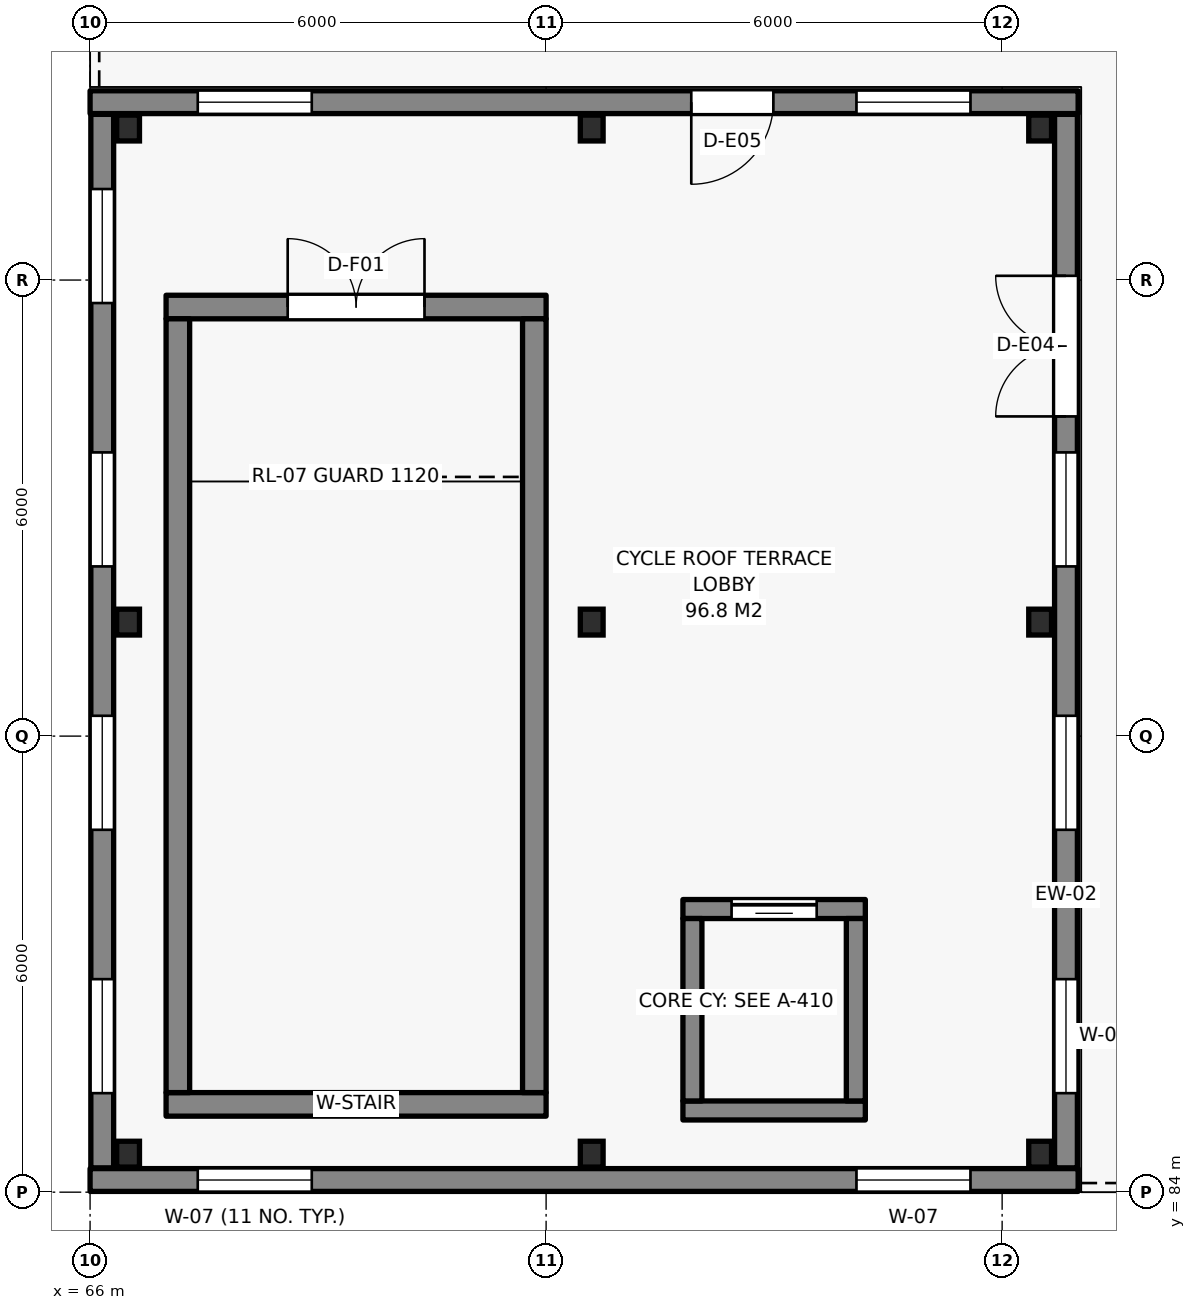
"""IFC4 building model, lengths in metres.
Left out: names, types, materials, properties, quantities, classifications, styles, units other than length and angle.
Written with IfcOpenShell. Run it as: python <this file> out.ifc"""

import sys

from ifc_helpers import new_model, si_unit, direction, frame, frame_2d, origin, origin_2d, place, context, subcontext, project, spatial, rectangle, i_section, extrude, element, fill, save


model = new_model("IFC4")
c1 = context("Model", 3, precision=1e-05, world=origin(), true_north=direction((0.0, 1.0)))
c2 = subcontext(c1, "Body", "Model", "MODEL_VIEW")
j1 = project(units=[si_unit("LENGTHUNIT", "METRE"), si_unit("PLANEANGLEUNIT", "RADIAN")], contexts=[c1])
p1 = place(None, origin())
s1 = spatial("IfcSite", under=j1, at=p1, CompositionType="ELEMENT")
p2 = place(p1, origin())
s2 = spatial("IfcBuilding", under=s1, at=p2, CompositionType="ELEMENT")
p3 = place(p2, frame((0.0, 0.0, 10.5)))
s3 = spatial("IfcBuildingStorey", under=s2, at=p3, CompositionType="ELEMENT", Elevation=10.5)
p4 = place(p3, frame((67.0, 85.155, 0.0), z_axis=(0.0, 0.0, 1.0), x_axis=(1.0, 0.0, 0.0)))
e1 = element("IfcWall", 1, at=p4, inside=s3, PredefinedType="SHEAR", context=c2, shape_type="SweptSolid", body=[
    extrude(rectangle(XDim=5.0, YDim=0.31, at=frame_2d((2.5, 0.0))), origin(), (0.0, 0.0, 1.0), 3.9),
])
p5 = place(p3, frame((67.0, 95.645, 0.0), z_axis=(0.0, 0.0, 1.0), x_axis=(1.0, 0.0, 0.0)))
e2 = element("IfcWall", 2, at=p5, inside=s3, PredefinedType="SHEAR", context=c2, shape_type="SweptSolid", body=[
    extrude(rectangle(XDim=5.0, YDim=0.31, at=frame_2d((2.5, 0.0))), origin(), (0.0, 0.0, 1.0), 3.9),
])
p6 = place(p5, frame((1.6, 0.0, 0.0)))
e3 = element("IfcOpeningElement", 3, at=p6, cuts=e2, PredefinedType="OPENING", context=c2, shape_type="SweptSolid", body=[
    extrude(rectangle(XDim=1.8, YDim=2.15, at=frame_2d((0.9, 1.075))), frame((0.0, 0.165, 0.0), z_axis=(0.0, -1.0, 0.0), x_axis=(1.0, 0.0, 0.0)), (0.0, 0.0, 1.0), 0.33),
])
for number, where, z_axis, x_axis in (
    (4, (67.155, 85.31, 0.0), (0.0, 0.0, 1.0), (0.0, 1.0, 0.0)),
    (5, (71.845, 85.31, 0.0), (0.0, 0.0, 1.0), (0.0, 1.0, 0.0)),
):
    element("IfcWall", number, at=place(p3, frame(where, z_axis=z_axis, x_axis=x_axis)), inside=s3, PredefinedType="SHEAR", context=c2, shape_type="SweptSolid", body=[
        extrude(rectangle(XDim=10.18, YDim=0.31, at=frame_2d((5.09, 0.0))), origin(), (0.0, 0.0, 1.0), 3.9),
    ])
for number, where, z_axis, x_axis in (
    (6, (66.5, 84.5, 0.0), (0.0, 0.0, 1.0), (1.0, 0.0, 0.0)),
    (7, (66.5, 91.5, 0.0), (0.0, 0.0, 1.0), (1.0, 0.0, 0.0)),
    (8, (66.5, 98.0, 0.0), (0.0, 0.0, 1.0), (1.0, 0.0, 0.0)),
    (9, (72.6, 84.5, 0.0), (0.0, 0.0, 1.0), (1.0, 0.0, 0.0)),
    (10, (72.6, 91.5, 0.0), (0.0, 0.0, 1.0), (1.0, 0.0, 0.0)),
    (11, (72.6, 98.0, 0.0), (0.0, 0.0, 1.0), (1.0, 0.0, 0.0)),
    (12, (78.5, 84.5, 0.0), (0.0, 0.0, 1.0), (1.0, 0.0, 0.0)),
    (13, (78.5, 91.5, 0.0), (0.0, 0.0, 1.0), (1.0, 0.0, 0.0)),
    (14, (78.5, 98.0, 0.0), (0.0, 0.0, 1.0), (1.0, 0.0, 0.0)),
):
    element("IfcColumn", number, at=place(p3, frame(where, z_axis=z_axis, x_axis=x_axis)), inside=s3, PredefinedType="COLUMN", context=c2, shape_type="SweptSolid", body=[
        extrude(i_section(OverallWidth=0.3, OverallDepth=0.34, WebThickness=0.012, FlangeThickness=0.021, FilletRadius=0.027, at=origin_2d()), origin(), (0.0, 0.0, 1.0), 3.9),
    ])
p7 = place(p3, frame((66.0, 84.16, 0.0), z_axis=(0.0, 0.0, 1.0), x_axis=(1.0, 0.0, 0.0)))
e15 = element("IfcWall", 15, at=p7, inside=s3, PredefinedType="SOLIDWALL", context=c2, shape_type="SweptSolid", body=[
    extrude(rectangle(XDim=13.0, YDim=0.3, at=frame_2d((6.5, 0.0))), origin(), (0.0, 0.0, 1.0), 3.88),
])
p8 = place(p7, frame((1.417, 0.0, 0.95)))
e16 = element("IfcOpeningElement", 16, at=p8, cuts=e15, PredefinedType="OPENING", context=c2, shape_type="SweptSolid", body=[
    extrude(rectangle(XDim=1.5, YDim=1.8, at=frame_2d((0.75, 0.9))), frame((0.0, 0.16, 0.0), z_axis=(0.0, -1.0, 0.0), x_axis=(1.0, 0.0, 0.0)), (0.0, 0.0, 1.0), 0.32),
])
p9 = place(p7, frame((10.083, 0.0, 0.95)))
e17 = element("IfcOpeningElement", 17, at=p9, cuts=e15, PredefinedType="OPENING", context=c2, shape_type="SweptSolid", body=[
    extrude(rectangle(XDim=1.5, YDim=1.8, at=frame_2d((0.75, 0.9))), frame((0.0, 0.16, 0.0), z_axis=(0.0, -1.0, 0.0), x_axis=(1.0, 0.0, 0.0)), (0.0, 0.0, 1.0), 0.32),
])
p10 = place(p3, frame((78.84, 84.32, 0.0), z_axis=(0.0, 0.0, 1.0), x_axis=(0.0, 1.0, 0.0)))
e18 = element("IfcWall", 18, at=p10, inside=s3, PredefinedType="SOLIDWALL", context=c2, shape_type="SweptSolid", body=[
    extrude(rectangle(XDim=13.86, YDim=0.3, at=frame_2d((6.93, 0.0))), origin(), (0.0, 0.0, 1.0), 3.88),
])
p11 = place(p10, frame((9.886, 0.0, 0.0)))
e19 = element("IfcOpeningElement", 19, at=p11, cuts=e18, PredefinedType="OPENING", context=c2, shape_type="SweptSolid", body=[
    extrude(rectangle(XDim=1.85, YDim=2.25, at=frame_2d((0.925, 1.125))), frame((0.0, 0.16, 0.0), z_axis=(0.0, -1.0, 0.0), x_axis=(1.0, 0.0, 0.0)), (0.0, 0.0, 1.0), 0.32),
])
p12 = place(p10, frame((0.982, 0.0, 0.95)))
e20 = element("IfcOpeningElement", 20, at=p12, cuts=e18, PredefinedType="OPENING", context=c2, shape_type="SweptSolid", body=[
    extrude(rectangle(XDim=1.5, YDim=1.8, at=frame_2d((0.75, 0.9))), frame((0.0, 0.16, 0.0), z_axis=(0.0, -1.0, 0.0), x_axis=(1.0, 0.0, 0.0)), (0.0, 0.0, 1.0), 0.32),
])
p13 = place(p10, frame((4.448, 0.0, 0.95)))
e21 = element("IfcOpeningElement", 21, at=p13, cuts=e18, PredefinedType="OPENING", context=c2, shape_type="SweptSolid", body=[
    extrude(rectangle(XDim=1.5, YDim=1.8, at=frame_2d((0.75, 0.9))), frame((0.0, 0.16, 0.0), z_axis=(0.0, -1.0, 0.0), x_axis=(1.0, 0.0, 0.0)), (0.0, 0.0, 1.0), 0.32),
])
p14 = place(p10, frame((7.913, 0.0, 0.95)))
e22 = element("IfcOpeningElement", 22, at=p14, cuts=e18, PredefinedType="OPENING", context=c2, shape_type="SweptSolid", body=[
    extrude(rectangle(XDim=1.5, YDim=1.8, at=frame_2d((0.75, 0.9))), frame((0.0, 0.16, 0.0), z_axis=(0.0, -1.0, 0.0), x_axis=(1.0, 0.0, 0.0)), (0.0, 0.0, 1.0), 0.32),
])
p15 = place(p3, frame((79.0, 98.34, 0.0), z_axis=(0.0, 0.0, 1.0), x_axis=(-1.0, 0.0, 0.0)))
e23 = element("IfcWall", 23, at=p15, inside=s3, PredefinedType="SOLIDWALL", context=c2, shape_type="SweptSolid", body=[
    extrude(rectangle(XDim=13.0, YDim=0.3, at=frame_2d((6.5, 0.0))), origin(), (0.0, 0.0, 1.0), 3.88),
])
p16 = place(p15, frame((4.01, 0.0, 0.0)))
e24 = element("IfcOpeningElement", 24, at=p16, cuts=e23, PredefinedType="OPENING", context=c2, shape_type="SweptSolid", body=[
    extrude(rectangle(XDim=1.08, YDim=2.2, at=frame_2d((0.54, 1.1))), frame((0.0, 0.16, 0.0), z_axis=(0.0, -1.0, 0.0), x_axis=(1.0, 0.0, 0.0)), (0.0, 0.0, 1.0), 0.32),
])
p17 = place(p15, frame((1.417, 0.0, 0.95)))
e25 = element("IfcOpeningElement", 25, at=p17, cuts=e23, PredefinedType="OPENING", context=c2, shape_type="SweptSolid", body=[
    extrude(rectangle(XDim=1.5, YDim=1.8, at=frame_2d((0.75, 0.9))), frame((0.0, 0.16, 0.0), z_axis=(0.0, -1.0, 0.0), x_axis=(1.0, 0.0, 0.0)), (0.0, 0.0, 1.0), 0.32),
])
p18 = place(p15, frame((10.083, 0.0, 0.95)))
e26 = element("IfcOpeningElement", 26, at=p18, cuts=e23, PredefinedType="OPENING", context=c2, shape_type="SweptSolid", body=[
    extrude(rectangle(XDim=1.5, YDim=1.8, at=frame_2d((0.75, 0.9))), frame((0.0, 0.16, 0.0), z_axis=(0.0, -1.0, 0.0), x_axis=(1.0, 0.0, 0.0)), (0.0, 0.0, 1.0), 0.32),
])
p19 = place(p3, frame((66.16, 98.18, 0.0), z_axis=(0.0, 0.0, 1.0), x_axis=(0.0, -1.0, 0.0)))
e27 = element("IfcWall", 27, at=p19, inside=s3, PredefinedType="SOLIDWALL", context=c2, shape_type="SweptSolid", body=[
    extrude(rectangle(XDim=13.86, YDim=0.3, at=frame_2d((6.93, 0.0))), origin(), (0.0, 0.0, 1.0), 3.88),
])
p20 = place(p19, frame((0.982, 0.0, 0.95)))
e28 = element("IfcOpeningElement", 28, at=p20, cuts=e27, PredefinedType="OPENING", context=c2, shape_type="SweptSolid", body=[
    extrude(rectangle(XDim=1.5, YDim=1.8, at=frame_2d((0.75, 0.9))), frame((0.0, 0.16, 0.0), z_axis=(0.0, -1.0, 0.0), x_axis=(1.0, 0.0, 0.0)), (0.0, 0.0, 1.0), 0.32),
])
p21 = place(p19, frame((4.448, 0.0, 0.95)))
e29 = element("IfcOpeningElement", 29, at=p21, cuts=e27, PredefinedType="OPENING", context=c2, shape_type="SweptSolid", body=[
    extrude(rectangle(XDim=1.5, YDim=1.8, at=frame_2d((0.75, 0.9))), frame((0.0, 0.16, 0.0), z_axis=(0.0, -1.0, 0.0), x_axis=(1.0, 0.0, 0.0)), (0.0, 0.0, 1.0), 0.32),
])
p22 = place(p19, frame((7.913, 0.0, 0.95)))
e30 = element("IfcOpeningElement", 30, at=p22, cuts=e27, PredefinedType="OPENING", context=c2, shape_type="SweptSolid", body=[
    extrude(rectangle(XDim=1.5, YDim=1.8, at=frame_2d((0.75, 0.9))), frame((0.0, 0.16, 0.0), z_axis=(0.0, -1.0, 0.0), x_axis=(1.0, 0.0, 0.0)), (0.0, 0.0, 1.0), 0.32),
])
p23 = place(p19, frame((11.377, 0.0, 0.95)))
e31 = element("IfcOpeningElement", 31, at=p23, cuts=e27, PredefinedType="OPENING", context=c2, shape_type="SweptSolid", body=[
    extrude(rectangle(XDim=1.5, YDim=1.8, at=frame_2d((0.75, 0.9))), frame((0.0, 0.16, 0.0), z_axis=(0.0, -1.0, 0.0), x_axis=(1.0, 0.0, 0.0)), (0.0, 0.0, 1.0), 0.32),
])
p24 = place(p3, frame((73.8, 85.075, 0.0), z_axis=(0.0, 0.0, 1.0), x_axis=(1.0, 0.0, 0.0)))
e32 = element("IfcWall", 32, at=p24, inside=s3, PredefinedType="SHEAR", context=c2, shape_type="SweptSolid", body=[
    extrude(rectangle(XDim=2.4, YDim=0.25, at=frame_2d((1.2, 0.0))), origin(), (0.0, 0.0, 1.0), 3.9),
])
p25 = place(p3, frame((73.8, 87.725, 0.0), z_axis=(0.0, 0.0, 1.0), x_axis=(1.0, 0.0, 0.0)))
e33 = element("IfcWall", 33, at=p25, inside=s3, PredefinedType="SHEAR", context=c2, shape_type="SweptSolid", body=[
    extrude(rectangle(XDim=2.4, YDim=0.25, at=frame_2d((1.2, 0.0))), origin(), (0.0, 0.0, 1.0), 3.9),
])
p26 = place(p25, frame((0.64, 0.0, 0.0)))
e34 = element("IfcOpeningElement", 34, at=p26, cuts=e33, PredefinedType="OPENING", context=c2, shape_type="SweptSolid", body=[
    extrude(rectangle(XDim=1.12, YDim=2.15, at=frame_2d((0.56, 1.075))), frame((0.0, 0.135, 0.0), z_axis=(0.0, -1.0, 0.0), x_axis=(1.0, 0.0, 0.0)), (0.0, 0.0, 1.0), 0.27),
])
for number, where, z_axis, x_axis in (
    (35, (73.925, 85.2, 0.0), (0.0, 0.0, 1.0), (0.0, 1.0, 0.0)),
    (36, (76.075, 85.2, 0.0), (0.0, 0.0, 1.0), (0.0, 1.0, 0.0)),
):
    element("IfcWall", number, at=place(p3, frame(where, z_axis=z_axis, x_axis=x_axis)), inside=s3, PredefinedType="SHEAR", context=c2, shape_type="SweptSolid", body=[
        extrude(rectangle(XDim=2.4, YDim=0.25, at=frame_2d((1.2, 0.0))), origin(), (0.0, 0.0, 1.0), 3.9),
    ])
p27 = place(p8, origin())
e37 = element("IfcWindow", 37, at=p27, inside=s3, PartitioningType="SINGLE_PANEL", PredefinedType="WINDOW", context=c2, shape_type="SweptSolid", body=[
    extrude(rectangle(XDim=1.5, YDim=1.8, at=frame_2d((0.75, 0.9))), frame((0.0, 0.03, 0.0), z_axis=(0.0, -1.0, 0.0), x_axis=(1.0, 0.0, 0.0)), (0.0, 0.0, 1.0), 0.06),
])
fill(e16, e37)
p28 = place(p9, origin())
e38 = element("IfcWindow", 38, at=p28, inside=s3, PartitioningType="SINGLE_PANEL", PredefinedType="WINDOW", context=c2, shape_type="SweptSolid", body=[
    extrude(rectangle(XDim=1.5, YDim=1.8, at=frame_2d((0.75, 0.9))), frame((0.0, 0.03, 0.0), z_axis=(0.0, -1.0, 0.0), x_axis=(1.0, 0.0, 0.0)), (0.0, 0.0, 1.0), 0.06),
])
fill(e17, e38)
p29 = place(p11, origin())
e39 = element("IfcDoor", 39, at=p29, inside=s3, OperationType="DOUBLE_DOOR_SINGLE_SWING", PredefinedType="DOOR", context=c2, shape_type="SweptSolid", body=[
    extrude(rectangle(XDim=1.85, YDim=2.25, at=frame_2d((0.925, 1.125))), frame((0.0, 0.025, 0.0), z_axis=(0.0, -1.0, 0.0), x_axis=(1.0, 0.0, 0.0)), (0.0, 0.0, 1.0), 0.05),
])
fill(e19, e39)
p30 = place(p12, origin())
e40 = element("IfcWindow", 40, at=p30, inside=s3, PartitioningType="SINGLE_PANEL", PredefinedType="WINDOW", context=c2, shape_type="SweptSolid", body=[
    extrude(rectangle(XDim=1.5, YDim=1.8, at=frame_2d((0.75, 0.9))), frame((0.0, 0.03, 0.0), z_axis=(0.0, -1.0, 0.0), x_axis=(1.0, 0.0, 0.0)), (0.0, 0.0, 1.0), 0.06),
])
fill(e20, e40)
p31 = place(p13, origin())
e41 = element("IfcWindow", 41, at=p31, inside=s3, PartitioningType="SINGLE_PANEL", PredefinedType="WINDOW", context=c2, shape_type="SweptSolid", body=[
    extrude(rectangle(XDim=1.5, YDim=1.8, at=frame_2d((0.75, 0.9))), frame((0.0, 0.03, 0.0), z_axis=(0.0, -1.0, 0.0), x_axis=(1.0, 0.0, 0.0)), (0.0, 0.0, 1.0), 0.06),
])
fill(e21, e41)
p32 = place(p14, origin())
e42 = element("IfcWindow", 42, at=p32, inside=s3, PartitioningType="SINGLE_PANEL", PredefinedType="WINDOW", context=c2, shape_type="SweptSolid", body=[
    extrude(rectangle(XDim=1.5, YDim=1.8, at=frame_2d((0.75, 0.9))), frame((0.0, 0.03, 0.0), z_axis=(0.0, -1.0, 0.0), x_axis=(1.0, 0.0, 0.0)), (0.0, 0.0, 1.0), 0.06),
])
fill(e22, e42)
p33 = place(p16, origin())
e43 = element("IfcDoor", 43, at=p33, inside=s3, OperationType="SINGLE_SWING_RIGHT", PredefinedType="DOOR", context=c2, shape_type="SweptSolid", body=[
    extrude(rectangle(XDim=1.08, YDim=2.2, at=frame_2d((0.54, 1.1))), frame((0.0, 0.025, 0.0), z_axis=(0.0, -1.0, 0.0), x_axis=(1.0, 0.0, 0.0)), (0.0, 0.0, 1.0), 0.05),
])
fill(e24, e43)
p34 = place(p17, origin())
e44 = element("IfcWindow", 44, at=p34, inside=s3, PartitioningType="SINGLE_PANEL", PredefinedType="WINDOW", context=c2, shape_type="SweptSolid", body=[
    extrude(rectangle(XDim=1.5, YDim=1.8, at=frame_2d((0.75, 0.9))), frame((0.0, 0.03, 0.0), z_axis=(0.0, -1.0, 0.0), x_axis=(1.0, 0.0, 0.0)), (0.0, 0.0, 1.0), 0.06),
])
fill(e25, e44)
p35 = place(p18, origin())
e45 = element("IfcWindow", 45, at=p35, inside=s3, PartitioningType="SINGLE_PANEL", PredefinedType="WINDOW", context=c2, shape_type="SweptSolid", body=[
    extrude(rectangle(XDim=1.5, YDim=1.8, at=frame_2d((0.75, 0.9))), frame((0.0, 0.03, 0.0), z_axis=(0.0, -1.0, 0.0), x_axis=(1.0, 0.0, 0.0)), (0.0, 0.0, 1.0), 0.06),
])
fill(e26, e45)
p36 = place(p20, origin())
e46 = element("IfcWindow", 46, at=p36, inside=s3, PartitioningType="SINGLE_PANEL", PredefinedType="WINDOW", context=c2, shape_type="SweptSolid", body=[
    extrude(rectangle(XDim=1.5, YDim=1.8, at=frame_2d((0.75, 0.9))), frame((0.0, 0.03, 0.0), z_axis=(0.0, -1.0, 0.0), x_axis=(1.0, 0.0, 0.0)), (0.0, 0.0, 1.0), 0.06),
])
fill(e28, e46)
p37 = place(p21, origin())
e47 = element("IfcWindow", 47, at=p37, inside=s3, PartitioningType="SINGLE_PANEL", PredefinedType="WINDOW", context=c2, shape_type="SweptSolid", body=[
    extrude(rectangle(XDim=1.5, YDim=1.8, at=frame_2d((0.75, 0.9))), frame((0.0, 0.03, 0.0), z_axis=(0.0, -1.0, 0.0), x_axis=(1.0, 0.0, 0.0)), (0.0, 0.0, 1.0), 0.06),
])
fill(e29, e47)
p38 = place(p22, origin())
e48 = element("IfcWindow", 48, at=p38, inside=s3, PartitioningType="SINGLE_PANEL", PredefinedType="WINDOW", context=c2, shape_type="SweptSolid", body=[
    extrude(rectangle(XDim=1.5, YDim=1.8, at=frame_2d((0.75, 0.9))), frame((0.0, 0.03, 0.0), z_axis=(0.0, -1.0, 0.0), x_axis=(1.0, 0.0, 0.0)), (0.0, 0.0, 1.0), 0.06),
])
fill(e30, e48)
p39 = place(p23, origin())
e49 = element("IfcWindow", 49, at=p39, inside=s3, PartitioningType="SINGLE_PANEL", PredefinedType="WINDOW", context=c2, shape_type="SweptSolid", body=[
    extrude(rectangle(XDim=1.5, YDim=1.8, at=frame_2d((0.75, 0.9))), frame((0.0, 0.03, 0.0), z_axis=(0.0, -1.0, 0.0), x_axis=(1.0, 0.0, 0.0)), (0.0, 0.0, 1.0), 0.06),
])
fill(e31, e49)
p40 = place(p26, origin())
e50 = element("IfcDoor", 50, at=p40, inside=s3, OperationType="SLIDING_TO_LEFT", PredefinedType="DOOR", context=c2, shape_type="SweptSolid", body=[
    extrude(rectangle(XDim=1.12, YDim=2.15, at=frame_2d((0.56, 1.075))), frame((0.0, 0.025, 0.0), z_axis=(0.0, -1.0, 0.0), x_axis=(1.0, 0.0, 0.0)), (0.0, 0.0, 1.0), 0.05),
])
fill(e34, e50)
p41 = place(p6, origin())
e51 = element("IfcDoor", 51, at=p41, inside=s3, OperationType="DOUBLE_DOOR_SINGLE_SWING", PredefinedType="DOOR", context=c2, shape_type="SweptSolid", body=[
    extrude(rectangle(XDim=1.8, YDim=2.15, at=frame_2d((0.9, 1.075))), frame((0.0, 0.025, 0.0), z_axis=(0.0, -1.0, 0.0), x_axis=(1.0, 0.0, 0.0)), (0.0, 0.0, 1.0), 0.05),
])
fill(e3, e51)
save(model, sys.argv[1])
